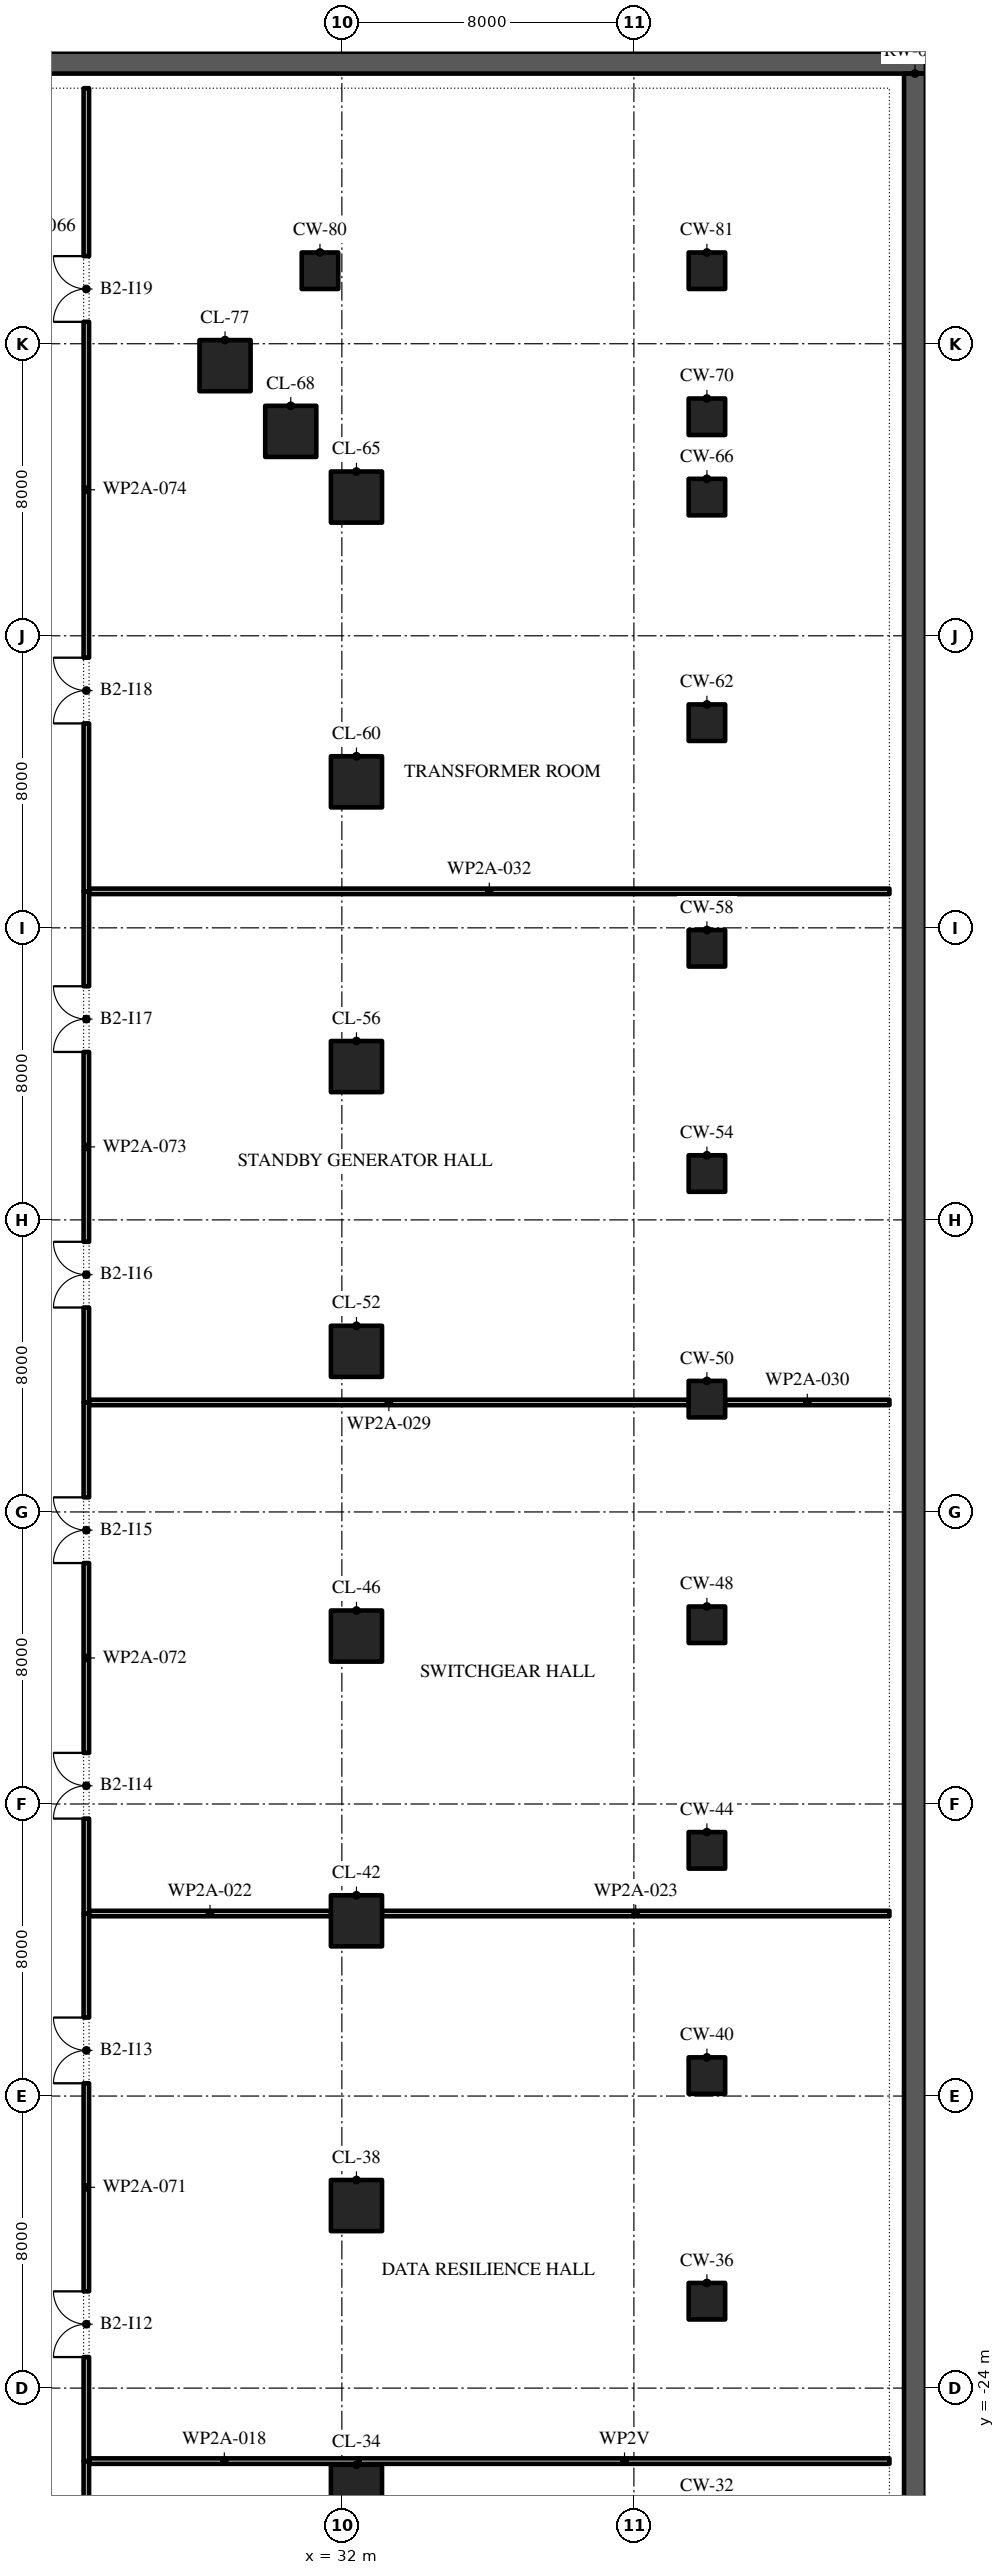
"""IFC4 building model, lengths in metres.
Left out: names, types, materials, properties, quantities, classifications, styles, units other than length and angle.
Written with IfcOpenShell. Run it as: python <this file> out.ifc"""

import sys

from ifc_helpers import new_model, si_unit, direction, frame, frame_2d, origin, origin_2d, place, context, subcontext, project, spatial, rectangle, extrude, element, fill, save


model = new_model("IFC4")
c1 = context("Model", 3, precision=1e-05, world=origin(), true_north=direction((0.0, 1.0)))
c2 = subcontext(c1, "Body", "Model", "MODEL_VIEW")
j1 = project(units=[si_unit("LENGTHUNIT", "METRE"), si_unit("PLANEANGLEUNIT", "RADIAN")], contexts=[c1])
p1 = place(None, origin())
s1 = spatial("IfcSite", under=j1, at=p1, CompositionType="ELEMENT")
p2 = place(p1, origin())
s2 = spatial("IfcBuilding", under=s1, at=p2, CompositionType="ELEMENT")
p3 = place(p2, frame((0.0, 0.0, -10.4)))
s3 = spatial("IfcBuildingStorey", under=s2, at=p3, CompositionType="ELEMENT", Elevation=-10.4)
p4 = place(p3, frame((-48.0, 39.7, -0.3), z_axis=(0.0, 0.0, 1.0), x_axis=(1.0, 0.0, 0.0)))
e1 = element("IfcWall", 1, at=p4, inside=s3, PredefinedType="SOLIDWALL", context=c2, shape_type="SweptSolid", body=[
    extrude(rectangle(XDim=96.0, YDim=0.6, at=frame_2d((48.0, 0.0))), origin(), (0.0, 0.0, 1.0), 5.5),
])
p5 = place(p3, frame((47.7, -55.4, -0.3), z_axis=(0.0, 0.0, 1.0), x_axis=(0.0, 1.0, 0.0)))
e2 = element("IfcWall", 2, at=p5, inside=s3, PredefinedType="SOLIDWALL", context=c2, shape_type="SweptSolid", body=[
    extrude(rectangle(XDim=94.8, YDim=0.6, at=frame_2d((47.4, 0.0))), origin(), (0.0, 0.0, 1.0), 5.5),
])
p6 = place(p3, frame((32.4, -26.8, -0.3), z_axis=(0.0, 0.0, 1.0), x_axis=(1.0, 0.0, 0.0)))
e3 = element("IfcColumn", 3, at=p6, inside=s3, PredefinedType="COLUMN", context=c2, shape_type="SweptSolid", body=[
    extrude(rectangle(XDim=1.4, YDim=1.4, at=origin_2d()), origin(), (0.0, 0.0, 1.0), 5.5),
])
p7 = place(p3, frame((42.0, -21.62, -0.3), z_axis=(0.0, 0.0, 1.0), x_axis=(1.0, 0.0, 0.0)))
e4 = element("IfcColumn", 4, at=p7, inside=s3, PredefinedType="COLUMN", context=c2, shape_type="SweptSolid", body=[
    extrude(rectangle(XDim=1.0, YDim=1.0, at=origin_2d()), origin(), (0.0, 0.0, 1.0), 5.5),
])
p8 = place(p3, frame((32.4, -19.0, -0.3), z_axis=(0.0, 0.0, 1.0), x_axis=(1.0, 0.0, 0.0)))
e5 = element("IfcColumn", 5, at=p8, inside=s3, PredefinedType="COLUMN", context=c2, shape_type="SweptSolid", body=[
    extrude(rectangle(XDim=1.4, YDim=1.4, at=origin_2d()), origin(), (0.0, 0.0, 1.0), 5.5),
])
p9 = place(p3, frame((42.0, -15.44, -0.3), z_axis=(0.0, 0.0, 1.0), x_axis=(1.0, 0.0, 0.0)))
e6 = element("IfcColumn", 6, at=p9, inside=s3, PredefinedType="COLUMN", context=c2, shape_type="SweptSolid", body=[
    extrude(rectangle(XDim=1.0, YDim=1.0, at=origin_2d()), origin(), (0.0, 0.0, 1.0), 5.5),
])
p10 = place(p3, frame((32.4, -11.2, -0.3), z_axis=(0.0, 0.0, 1.0), x_axis=(1.0, 0.0, 0.0)))
e7 = element("IfcColumn", 7, at=p10, inside=s3, PredefinedType="COLUMN", context=c2, shape_type="SweptSolid", body=[
    extrude(rectangle(XDim=1.4, YDim=1.4, at=origin_2d()), origin(), (0.0, 0.0, 1.0), 5.5),
])
p11 = place(p3, frame((42.0, -9.27, -0.3), z_axis=(0.0, 0.0, 1.0), x_axis=(1.0, 0.0, 0.0)))
e8 = element("IfcColumn", 8, at=p11, inside=s3, PredefinedType="COLUMN", context=c2, shape_type="SweptSolid", body=[
    extrude(rectangle(XDim=1.0, YDim=1.0, at=origin_2d()), origin(), (0.0, 0.0, 1.0), 5.5),
])
p12 = place(p3, frame((32.4, -3.4, -0.3), z_axis=(0.0, 0.0, 1.0), x_axis=(1.0, 0.0, 0.0)))
e9 = element("IfcColumn", 9, at=p12, inside=s3, PredefinedType="COLUMN", context=c2, shape_type="SweptSolid", body=[
    extrude(rectangle(XDim=1.4, YDim=1.4, at=origin_2d()), origin(), (0.0, 0.0, 1.0), 5.5),
])
for number, where, z_axis, x_axis in (
    (10, (42.0, -3.09, -0.3), (0.0, 0.0, 1.0), (1.0, 0.0, 0.0)),
    (11, (42.0, 3.09, -0.3), (0.0, 0.0, 1.0), (1.0, 0.0, 0.0)),
):
    element("IfcColumn", number, at=place(p3, frame(where, z_axis=z_axis, x_axis=x_axis)), inside=s3, PredefinedType="COLUMN", context=c2, shape_type="SweptSolid", body=[
        extrude(rectangle(XDim=1.0, YDim=1.0, at=origin_2d()), origin(), (0.0, 0.0, 1.0), 5.5),
    ])
p13 = place(p3, frame((32.4, 4.4, -0.3), z_axis=(0.0, 0.0, 1.0), x_axis=(1.0, 0.0, 0.0)))
e12 = element("IfcColumn", 12, at=p13, inside=s3, PredefinedType="COLUMN", context=c2, shape_type="SweptSolid", body=[
    extrude(rectangle(XDim=1.4, YDim=1.4, at=origin_2d()), origin(), (0.0, 0.0, 1.0), 5.5),
])
p14 = place(p3, frame((42.0, 9.27, -0.3), z_axis=(0.0, 0.0, 1.0), x_axis=(1.0, 0.0, 0.0)))
e13 = element("IfcColumn", 13, at=p14, inside=s3, PredefinedType="COLUMN", context=c2, shape_type="SweptSolid", body=[
    extrude(rectangle(XDim=1.0, YDim=1.0, at=origin_2d()), origin(), (0.0, 0.0, 1.0), 5.5),
])
p15 = place(p3, frame((32.4, 12.2, -0.3), z_axis=(0.0, 0.0, 1.0), x_axis=(1.0, 0.0, 0.0)))
e14 = element("IfcColumn", 14, at=p15, inside=s3, PredefinedType="COLUMN", context=c2, shape_type="SweptSolid", body=[
    extrude(rectangle(XDim=1.4, YDim=1.4, at=origin_2d()), origin(), (0.0, 0.0, 1.0), 5.5),
])
p16 = place(p3, frame((42.0, 15.44, -0.3), z_axis=(0.0, 0.0, 1.0), x_axis=(1.0, 0.0, 0.0)))
e15 = element("IfcColumn", 15, at=p16, inside=s3, PredefinedType="COLUMN", context=c2, shape_type="SweptSolid", body=[
    extrude(rectangle(XDim=1.0, YDim=1.0, at=origin_2d()), origin(), (0.0, 0.0, 1.0), 5.5),
])
p17 = place(p3, frame((32.4, 20.0, -0.3), z_axis=(0.0, 0.0, 1.0), x_axis=(1.0, 0.0, 0.0)))
e16 = element("IfcColumn", 16, at=p17, inside=s3, PredefinedType="COLUMN", context=c2, shape_type="SweptSolid", body=[
    extrude(rectangle(XDim=1.4, YDim=1.4, at=origin_2d()), origin(), (0.0, 0.0, 1.0), 5.5),
])
p18 = place(p3, frame((42.0, 21.62, -0.3), z_axis=(0.0, 0.0, 1.0), x_axis=(1.0, 0.0, 0.0)))
e17 = element("IfcColumn", 17, at=p18, inside=s3, PredefinedType="COLUMN", context=c2, shape_type="SweptSolid", body=[
    extrude(rectangle(XDim=1.0, YDim=1.0, at=origin_2d()), origin(), (0.0, 0.0, 1.0), 5.5),
])
p19 = place(p3, frame((32.4, 27.8, -0.3), z_axis=(0.0, 0.0, 1.0), x_axis=(1.0, 0.0, 0.0)))
e18 = element("IfcColumn", 18, at=p19, inside=s3, PredefinedType="COLUMN", context=c2, shape_type="SweptSolid", body=[
    extrude(rectangle(XDim=1.4, YDim=1.4, at=origin_2d()), origin(), (0.0, 0.0, 1.0), 5.5),
])
p20 = place(p3, frame((42.0, 27.8, -0.3), z_axis=(0.0, 0.0, 1.0), x_axis=(1.0, 0.0, 0.0)))
e19 = element("IfcColumn", 19, at=p20, inside=s3, PredefinedType="COLUMN", context=c2, shape_type="SweptSolid", body=[
    extrude(rectangle(XDim=1.0, YDim=1.0, at=origin_2d()), origin(), (0.0, 0.0, 1.0), 5.5),
])
p21 = place(p3, frame((30.6, 29.6, -0.3), z_axis=(0.0, 0.0, 1.0), x_axis=(1.0, 0.0, 0.0)))
e20 = element("IfcColumn", 20, at=p21, inside=s3, PredefinedType="COLUMN", context=c2, shape_type="SweptSolid", body=[
    extrude(rectangle(XDim=1.4, YDim=1.4, at=origin_2d()), origin(), (0.0, 0.0, 1.0), 5.5),
])
p22 = place(p3, frame((42.0, 30.0, -0.3), z_axis=(0.0, 0.0, 1.0), x_axis=(1.0, 0.0, 0.0)))
e21 = element("IfcColumn", 21, at=p22, inside=s3, PredefinedType="COLUMN", context=c2, shape_type="SweptSolid", body=[
    extrude(rectangle(XDim=1.0, YDim=1.0, at=origin_2d()), origin(), (0.0, 0.0, 1.0), 5.5),
])
p23 = place(p3, frame((28.8, 31.4, -0.3), z_axis=(0.0, 0.0, 1.0), x_axis=(1.0, 0.0, 0.0)))
e22 = element("IfcColumn", 22, at=p23, inside=s3, PredefinedType="COLUMN", context=c2, shape_type="SweptSolid", body=[
    extrude(rectangle(XDim=1.4, YDim=1.4, at=origin_2d()), origin(), (0.0, 0.0, 1.0), 5.5),
])
for number, where, z_axis, x_axis in (
    (23, (31.4, 34.0, -0.3), (0.0, 0.0, 1.0), (1.0, 0.0, 0.0)),
    (24, (42.0, 34.0, -0.3), (0.0, 0.0, 1.0), (1.0, 0.0, 0.0)),
):
    element("IfcColumn", number, at=place(p3, frame(where, z_axis=z_axis, x_axis=x_axis)), inside=s3, PredefinedType="COLUMN", context=c2, shape_type="SweptSolid", body=[
        extrude(rectangle(XDim=1.0, YDim=1.0, at=origin_2d()), origin(), (0.0, 0.0, 1.0), 5.5),
    ])
p24 = place(p3, frame((25.075, -26.0, 0.0), z_axis=(0.0, 0.0, 1.0), x_axis=(1.0, 0.0, 0.0)))
e25 = element("IfcWall", 25, at=p24, inside=s3, PredefinedType="PARTITIONING", context=c2, shape_type="SweptSolid", body=[
    extrude(rectangle(XDim=7.411, YDim=0.15, at=frame_2d((3.705, 0.0))), origin(), (0.0, 0.0, 1.0), 4.9),
])
p25 = place(p3, frame((25.075, -11.0, 0.0), z_axis=(0.0, 0.0, 1.0), x_axis=(1.0, 0.0, 0.0)))
e26 = element("IfcWall", 26, at=p25, inside=s3, PredefinedType="PARTITIONING", context=c2, shape_type="SweptSolid", body=[
    extrude(rectangle(XDim=6.625, YDim=0.15, at=frame_2d((3.312, 0.0))), origin(), (0.0, 0.0, 1.0), 4.9),
])
p26 = place(p3, frame((33.1, -11.0, 0.0), z_axis=(0.0, 0.0, 1.0), x_axis=(1.0, 0.0, 0.0)))
e27 = element("IfcWall", 27, at=p26, inside=s3, PredefinedType="PARTITIONING", context=c2, shape_type="SweptSolid", body=[
    extrude(rectangle(XDim=13.9, YDim=0.15, at=frame_2d((6.95, 0.0))), origin(), (0.0, 0.0, 1.0), 4.9),
])
p27 = place(p3, frame((25.075, 3.0, 0.0), z_axis=(0.0, 0.0, 1.0), x_axis=(1.0, 0.0, 0.0)))
e28 = element("IfcWall", 28, at=p27, inside=s3, PredefinedType="PARTITIONING", context=c2, shape_type="SweptSolid", body=[
    extrude(rectangle(XDim=16.425, YDim=0.15, at=frame_2d((8.212, 0.0))), origin(), (0.0, 0.0, 1.0), 4.9),
])
p28 = place(p3, frame((42.5, 3.0, 0.0), z_axis=(0.0, 0.0, 1.0), x_axis=(1.0, 0.0, 0.0)))
e29 = element("IfcWall", 29, at=p28, inside=s3, PredefinedType="PARTITIONING", context=c2, shape_type="SweptSolid", body=[
    extrude(rectangle(XDim=4.5, YDim=0.15, at=frame_2d((2.25, 0.0))), origin(), (0.0, 0.0, 1.0), 4.9),
])
p29 = place(p3, frame((25.075, 17.0, 0.0), z_axis=(0.0, 0.0, 1.0), x_axis=(1.0, 0.0, 0.0)))
e30 = element("IfcWall", 30, at=p29, inside=s3, PredefinedType="PARTITIONING", context=c2, shape_type="SweptSolid", body=[
    extrude(rectangle(XDim=21.925, YDim=0.15, at=frame_2d((10.962, 0.0))), origin(), (0.0, 0.0, 1.0), 4.9),
])
p30 = place(p3, frame((25.0, -30.9, 0.0), z_axis=(0.0, 0.0, 1.0), x_axis=(0.0, 1.0, 0.0)))
e31 = element("IfcWall", 31, at=p30, inside=s3, PredefinedType="PARTITIONING", context=c2, shape_type="SweptSolid", body=[
    extrude(rectangle(XDim=4.9, YDim=0.15, at=frame_2d((2.45, 0.0))), origin(), (0.0, 0.0, 1.0), 4.9),
])
p31 = place(p3, frame((25.0, -26.0, 0.0), z_axis=(0.0, 0.0, 1.0), x_axis=(0.0, 1.0, 0.0)))
e32 = element("IfcWall", 32, at=p31, inside=s3, PredefinedType="PARTITIONING", context=c2, shape_type="SweptSolid", body=[
    extrude(rectangle(XDim=15.0, YDim=0.15, at=frame_2d((7.5, 0.0))), origin(), (0.0, 0.0, 1.0), 4.9),
])
p32 = place(p31, frame((2.85, 0.0, 0.0)))
e33 = element("IfcOpeningElement", 33, at=p32, cuts=e32, PredefinedType="OPENING", context=c2, shape_type="SweptSolid", body=[
    extrude(rectangle(XDim=1.8, YDim=2.1, at=frame_2d((0.9, 1.05))), frame((0.0, 0.085, 0.0), z_axis=(0.0, -1.0, 0.0), x_axis=(1.0, 0.0, 0.0)), (0.0, 0.0, 1.0), 0.17),
])
p33 = place(p31, frame((10.35, 0.0, 0.0)))
e34 = element("IfcOpeningElement", 34, at=p33, cuts=e32, PredefinedType="OPENING", context=c2, shape_type="SweptSolid", body=[
    extrude(rectangle(XDim=1.8, YDim=2.1, at=frame_2d((0.9, 1.05))), frame((0.0, 0.085, 0.0), z_axis=(0.0, -1.0, 0.0), x_axis=(1.0, 0.0, 0.0)), (0.0, 0.0, 1.0), 0.17),
])
p34 = place(p3, frame((25.0, -11.0, 0.0), z_axis=(0.0, 0.0, 1.0), x_axis=(0.0, 1.0, 0.0)))
e35 = element("IfcWall", 35, at=p34, inside=s3, PredefinedType="PARTITIONING", context=c2, shape_type="SweptSolid", body=[
    extrude(rectangle(XDim=14.0, YDim=0.15, at=frame_2d((7.0, 0.0))), origin(), (0.0, 0.0, 1.0), 4.9),
])
p35 = place(p34, frame((2.6, 0.0, 0.0)))
e36 = element("IfcOpeningElement", 36, at=p35, cuts=e35, PredefinedType="OPENING", context=c2, shape_type="SweptSolid", body=[
    extrude(rectangle(XDim=1.8, YDim=2.1, at=frame_2d((0.9, 1.05))), frame((0.0, 0.085, 0.0), z_axis=(0.0, -1.0, 0.0), x_axis=(1.0, 0.0, 0.0)), (0.0, 0.0, 1.0), 0.17),
])
p36 = place(p34, frame((9.6, 0.0, 0.0)))
e37 = element("IfcOpeningElement", 37, at=p36, cuts=e35, PredefinedType="OPENING", context=c2, shape_type="SweptSolid", body=[
    extrude(rectangle(XDim=1.8, YDim=2.1, at=frame_2d((0.9, 1.05))), frame((0.0, 0.085, 0.0), z_axis=(0.0, -1.0, 0.0), x_axis=(1.0, 0.0, 0.0)), (0.0, 0.0, 1.0), 0.17),
])
p37 = place(p3, frame((25.0, 3.0, 0.0), z_axis=(0.0, 0.0, 1.0), x_axis=(0.0, 1.0, 0.0)))
e38 = element("IfcWall", 38, at=p37, inside=s3, PredefinedType="PARTITIONING", context=c2, shape_type="SweptSolid", body=[
    extrude(rectangle(XDim=14.0, YDim=0.15, at=frame_2d((7.0, 0.0))), origin(), (0.0, 0.0, 1.0), 4.9),
])
p38 = place(p37, frame((2.6, 0.0, 0.0)))
e39 = element("IfcOpeningElement", 39, at=p38, cuts=e38, PredefinedType="OPENING", context=c2, shape_type="SweptSolid", body=[
    extrude(rectangle(XDim=1.8, YDim=2.1, at=frame_2d((0.9, 1.05))), frame((0.0, 0.085, 0.0), z_axis=(0.0, -1.0, 0.0), x_axis=(1.0, 0.0, 0.0)), (0.0, 0.0, 1.0), 0.17),
])
p39 = place(p37, frame((9.6, 0.0, 0.0)))
e40 = element("IfcOpeningElement", 40, at=p39, cuts=e38, PredefinedType="OPENING", context=c2, shape_type="SweptSolid", body=[
    extrude(rectangle(XDim=1.8, YDim=2.1, at=frame_2d((0.9, 1.05))), frame((0.0, 0.085, 0.0), z_axis=(0.0, -1.0, 0.0), x_axis=(1.0, 0.0, 0.0)), (0.0, 0.0, 1.0), 0.17),
])
p40 = place(p3, frame((25.0, 17.0, 0.0), z_axis=(0.0, 0.0, 1.0), x_axis=(0.0, 1.0, 0.0)))
e41 = element("IfcWall", 41, at=p40, inside=s3, PredefinedType="PARTITIONING", context=c2, shape_type="SweptSolid", body=[
    extrude(rectangle(XDim=22.0, YDim=0.15, at=frame_2d((11.0, 0.0))), origin(), (0.0, 0.0, 1.0), 4.9),
])
p41 = place(p40, frame((4.6, 0.0, 0.0)))
e42 = element("IfcOpeningElement", 42, at=p41, cuts=e41, PredefinedType="OPENING", context=c2, shape_type="SweptSolid", body=[
    extrude(rectangle(XDim=1.8, YDim=2.1, at=frame_2d((0.9, 1.05))), frame((0.0, 0.085, 0.0), z_axis=(0.0, -1.0, 0.0), x_axis=(1.0, 0.0, 0.0)), (0.0, 0.0, 1.0), 0.17),
])
p42 = place(p40, frame((15.6, 0.0, 0.0)))
e43 = element("IfcOpeningElement", 43, at=p42, cuts=e41, PredefinedType="OPENING", context=c2, shape_type="SweptSolid", body=[
    extrude(rectangle(XDim=1.8, YDim=2.1, at=frame_2d((0.9, 1.05))), frame((0.0, 0.085, 0.0), z_axis=(0.0, -1.0, 0.0), x_axis=(1.0, 0.0, 0.0)), (0.0, 0.0, 1.0), 0.17),
])
p43 = place(p3, frame((32.486, -26.0, 0.0), z_axis=(0.0, 0.0, 1.0), x_axis=(1.0, 0.0, 0.0)))
e44 = element("IfcWall", 44, at=p43, inside=s3, PredefinedType="PARTITIONING", context=c2, shape_type="SweptSolid", body=[
    extrude(rectangle(XDim=14.514, YDim=0.15, at=frame_2d((7.257, 0.0))), origin(), (0.0, 0.0, 1.0), 4.443),
])
p44 = place(p32, origin())
e45 = element("IfcDoor", 45, at=p44, inside=s3, OperationType="SINGLE_SWING_RIGHT", PredefinedType="DOOR", context=c2, shape_type="SweptSolid", body=[
    extrude(rectangle(XDim=1.8, YDim=2.1, at=frame_2d((0.9, 1.05))), frame((0.0, 0.025, 0.0), z_axis=(0.0, -1.0, 0.0), x_axis=(1.0, 0.0, 0.0)), (0.0, 0.0, 1.0), 0.05),
])
fill(e33, e45)
p45 = place(p33, origin())
e46 = element("IfcDoor", 46, at=p45, inside=s3, OperationType="SINGLE_SWING_RIGHT", PredefinedType="DOOR", context=c2, shape_type="SweptSolid", body=[
    extrude(rectangle(XDim=1.8, YDim=2.1, at=frame_2d((0.9, 1.05))), frame((0.0, 0.025, 0.0), z_axis=(0.0, -1.0, 0.0), x_axis=(1.0, 0.0, 0.0)), (0.0, 0.0, 1.0), 0.05),
])
fill(e34, e46)
p46 = place(p35, origin())
e47 = element("IfcDoor", 47, at=p46, inside=s3, OperationType="SINGLE_SWING_LEFT", PredefinedType="DOOR", context=c2, shape_type="SweptSolid", body=[
    extrude(rectangle(XDim=1.8, YDim=2.1, at=frame_2d((0.9, 1.05))), frame((0.0, 0.025, 0.0), z_axis=(0.0, -1.0, 0.0), x_axis=(1.0, 0.0, 0.0)), (0.0, 0.0, 1.0), 0.05),
])
fill(e36, e47)
p47 = place(p36, origin())
e48 = element("IfcDoor", 48, at=p47, inside=s3, OperationType="SINGLE_SWING_LEFT", PredefinedType="DOOR", context=c2, shape_type="SweptSolid", body=[
    extrude(rectangle(XDim=1.8, YDim=2.1, at=frame_2d((0.9, 1.05))), frame((0.0, 0.025, 0.0), z_axis=(0.0, -1.0, 0.0), x_axis=(1.0, 0.0, 0.0)), (0.0, 0.0, 1.0), 0.05),
])
fill(e37, e48)
p48 = place(p38, origin())
e49 = element("IfcDoor", 49, at=p48, inside=s3, OperationType="SINGLE_SWING_LEFT", PredefinedType="DOOR", context=c2, shape_type="SweptSolid", body=[
    extrude(rectangle(XDim=1.8, YDim=2.1, at=frame_2d((0.9, 1.05))), frame((0.0, 0.025, 0.0), z_axis=(0.0, -1.0, 0.0), x_axis=(1.0, 0.0, 0.0)), (0.0, 0.0, 1.0), 0.05),
])
fill(e39, e49)
p49 = place(p39, origin())
e50 = element("IfcDoor", 50, at=p49, inside=s3, OperationType="SINGLE_SWING_LEFT", PredefinedType="DOOR", context=c2, shape_type="SweptSolid", body=[
    extrude(rectangle(XDim=1.8, YDim=2.1, at=frame_2d((0.9, 1.05))), frame((0.0, 0.025, 0.0), z_axis=(0.0, -1.0, 0.0), x_axis=(1.0, 0.0, 0.0)), (0.0, 0.0, 1.0), 0.05),
])
fill(e40, e50)
p50 = place(p41, origin())
e51 = element("IfcDoor", 51, at=p50, inside=s3, OperationType="SINGLE_SWING_RIGHT", PredefinedType="DOOR", context=c2, shape_type="SweptSolid", body=[
    extrude(rectangle(XDim=1.8, YDim=2.1, at=frame_2d((0.9, 1.05))), frame((0.0, 0.025, 0.0), z_axis=(0.0, -1.0, 0.0), x_axis=(1.0, 0.0, 0.0)), (0.0, 0.0, 1.0), 0.05),
])
fill(e42, e51)
p51 = place(p42, origin())
e52 = element("IfcDoor", 52, at=p51, inside=s3, OperationType="SINGLE_SWING_RIGHT", PredefinedType="DOOR", context=c2, shape_type="SweptSolid", body=[
    extrude(rectangle(XDim=1.8, YDim=2.1, at=frame_2d((0.9, 1.05))), frame((0.0, 0.025, 0.0), z_axis=(0.0, -1.0, 0.0), x_axis=(1.0, 0.0, 0.0)), (0.0, 0.0, 1.0), 0.05),
])
fill(e43, e52)
save(model, sys.argv[1])
